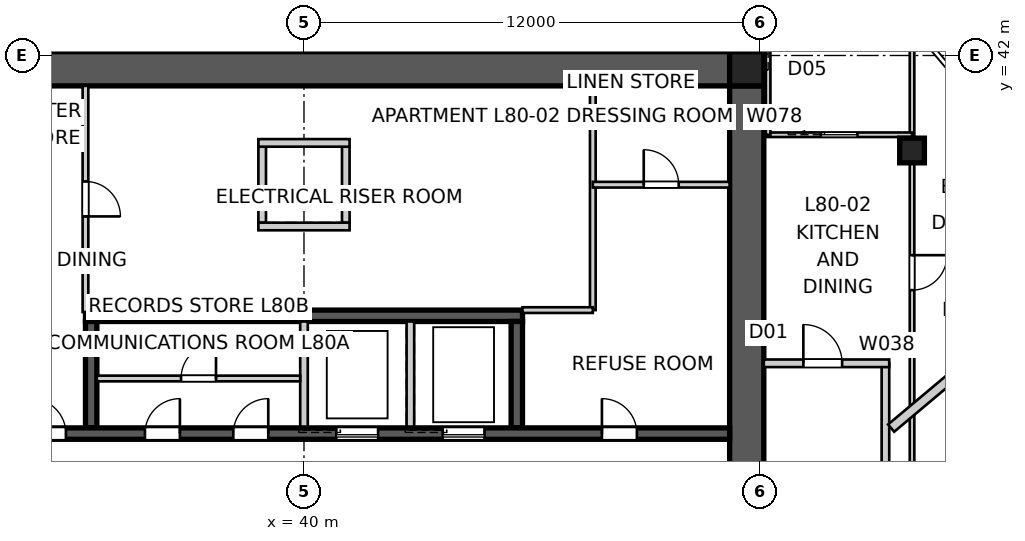
"""IFC4 building model, lengths in metres.
Left out: names, types, materials, properties, quantities, classifications, styles, units other than length and angle.
Written with IfcOpenShell. Run it as: python <this file> out.ifc"""

import sys

from ifc_helpers import new_model, si_unit, direction, frame, frame_2d, origin, origin_2d, place, context, subcontext, project, spatial, polyline, rectangle, outline, extrude, element, fill, save


model = new_model("IFC4")
c1 = context("Model", 3, precision=1e-05, world=origin(), true_north=direction((0.0, 1.0)))
c2 = subcontext(c1, "Body", "Model", "MODEL_VIEW")
j1 = project(units=[si_unit("LENGTHUNIT", "METRE"), si_unit("PLANEANGLEUNIT", "RADIAN")], contexts=[c1])
p1 = place(None, origin())
s1 = spatial("IfcSite", under=j1, at=p1, CompositionType="ELEMENT")
p2 = place(p1, origin())
s2 = spatial("IfcBuilding", under=s1, at=p2, CompositionType="ELEMENT")
p3 = place(p2, frame((0.0, 0.0, 289.6)))
s3 = spatial("IfcBuildingStorey", under=s2, at=p3, CompositionType="ELEMENT", Elevation=289.6)
p4 = place(p3, frame((28.8, 41.65, 0.0), z_axis=(0.0, 0.0, 1.0), x_axis=(1.0, 0.0, 0.0)))
e1 = element("IfcWall", 1, at=p4, inside=s3, PredefinedType="SHEAR", context=c2, shape_type="SweptSolid", body=[
    extrude(outline(polyline([(0.0, -0.45), (22.4, -0.45), (22.4, -0.025), (22.85, -0.025), (22.85, 0.025), (22.4, 0.025), (22.4, 0.45), (0.0, 0.45), (0.0, 0.025), (-0.45, 0.025), (-0.45, -0.025), (0.0, -0.025), (0.0, -0.45)])), origin(), (0.0, 0.0, 1.0), 3.4),
])
p5 = place(p3, frame((51.65, 18.8, 0.0), z_axis=(0.0, 0.0, 1.0), x_axis=(0.0, 1.0, 0.0)))
e2 = element("IfcWall", 2, at=p5, inside=s3, PredefinedType="SHEAR", context=c2, shape_type="SweptSolid", body=[
    extrude(outline(polyline([(0.0, -0.45), (22.4, -0.45), (22.4, -0.025), (22.85, -0.025), (22.85, 0.025), (22.4, 0.025), (22.4, 0.45), (0.0, 0.45), (0.0, 0.025), (-0.45, 0.025), (-0.45, -0.025), (0.0, -0.025), (0.0, -0.45)])), origin(), (0.0, 0.0, 1.0), 3.4),
])
p6 = place(p5, frame((11.14, 0.0, 0.0)))
e3 = element("IfcOpeningElement", 3, at=p6, cuts=e2, PredefinedType="OPENING", context=c2, shape_type="SweptSolid", body=[
    extrude(rectangle(XDim=1.02, YDim=2.4, at=frame_2d((0.51, 1.2))), frame((0.0, 0.46, 0.0), z_axis=(0.0, -1.0, 0.0), x_axis=(1.0, 0.0, 0.0)), (0.0, 0.0, 1.0), 0.92),
])
p7 = place(p3, frame((28.8, 32.05, 0.0), z_axis=(0.0, 0.0, 1.0), x_axis=(1.0, 0.0, 0.0)))
e4 = element("IfcWall", 4, at=p7, inside=s3, PredefinedType="SHEAR", context=c2, shape_type="SweptSolid", body=[
    extrude(rectangle(XDim=22.4, YDim=0.3, at=frame_2d((11.2, 0.0))), origin(), (0.0, 0.0, 1.0), 3.4),
])
p8 = place(p7, frame((19.04, 0.0, 0.0)))
e5 = element("IfcOpeningElement", 5, at=p8, cuts=e4, PredefinedType="OPENING", context=c2, shape_type="SweptSolid", body=[
    extrude(rectangle(XDim=0.92, YDim=2.1, at=frame_2d((0.46, 1.05))), frame((0.0, 0.16, 0.0), z_axis=(0.0, -1.0, 0.0), x_axis=(1.0, 0.0, 0.0)), (0.0, 0.0, 1.0), 0.32),
])
p9 = place(p7, frame((1.265, 0.0, 0.0)))
e6 = element("IfcOpeningElement", 6, at=p9, cuts=e4, PredefinedType="OPENING", context=c2, shape_type="SweptSolid", body=[
    extrude(rectangle(XDim=1.02, YDim=2.1, at=frame_2d((0.51, 1.05))), frame((0.0, 0.16, 0.0), z_axis=(0.0, -1.0, 0.0), x_axis=(1.0, 0.0, 0.0)), (0.0, 0.0, 1.0), 0.32),
])
p10 = place(p7, frame((4.015, 0.0, 0.0)))
e7 = element("IfcOpeningElement", 7, at=p10, cuts=e4, PredefinedType="OPENING", context=c2, shape_type="SweptSolid", body=[
    extrude(rectangle(XDim=0.92, YDim=2.1, at=frame_2d((0.46, 1.05))), frame((0.0, 0.16, 0.0), z_axis=(0.0, -1.0, 0.0), x_axis=(1.0, 0.0, 0.0)), (0.0, 0.0, 1.0), 0.32),
])
p11 = place(p7, frame((7.015, 0.0, 0.0)))
e8 = element("IfcOpeningElement", 8, at=p11, cuts=e4, PredefinedType="OPENING", context=c2, shape_type="SweptSolid", body=[
    extrude(rectangle(XDim=0.92, YDim=2.1, at=frame_2d((0.46, 1.05))), frame((0.0, 0.16, 0.0), z_axis=(0.0, -1.0, 0.0), x_axis=(1.0, 0.0, 0.0)), (0.0, 0.0, 1.0), 0.32),
])
p12 = place(p7, frame((9.34, 0.0, 0.0)))
e9 = element("IfcOpeningElement", 9, at=p12, cuts=e4, PredefinedType="OPENING", context=c2, shape_type="SweptSolid", body=[
    extrude(rectangle(XDim=0.92, YDim=2.1, at=frame_2d((0.46, 1.05))), frame((0.0, 0.16, 0.0), z_axis=(0.0, -1.0, 0.0), x_axis=(1.0, 0.0, 0.0)), (0.0, 0.0, 1.0), 0.32),
])
p13 = place(p7, frame((12.05, 0.0, 0.0)))
e10 = element("IfcOpeningElement", 10, at=p13, cuts=e4, PredefinedType="OPENING", context=c2, shape_type="SweptSolid", body=[
    extrude(rectangle(XDim=1.1, YDim=2.1, at=frame_2d((0.55, 1.05))), frame((0.0, 0.16, 0.0), z_axis=(0.0, -1.0, 0.0), x_axis=(1.0, 0.0, 0.0)), (0.0, 0.0, 1.0), 0.32),
])
p14 = place(p7, frame((14.85, 0.0, 0.0)))
e11 = element("IfcOpeningElement", 11, at=p14, cuts=e4, PredefinedType="OPENING", context=c2, shape_type="SweptSolid", body=[
    extrude(rectangle(XDim=1.1, YDim=2.1, at=frame_2d((0.55, 1.05))), frame((0.0, 0.16, 0.0), z_axis=(0.0, -1.0, 0.0), x_axis=(1.0, 0.0, 0.0)), (0.0, 0.0, 1.0), 0.32),
])
p15 = place(p3, frame((34.25, 35.15, 0.0), z_axis=(0.0, 0.0, 1.0), x_axis=(1.0, 0.0, 0.0)))
e12 = element("IfcWall", 12, at=p15, inside=s3, PredefinedType="SHEAR", context=c2, shape_type="SweptSolid", body=[
    extrude(rectangle(XDim=11.5, YDim=0.3, at=frame_2d((5.75, 0.0))), origin(), (0.0, 0.0, 1.0), 3.4),
])
p16 = place(p3, frame((34.4, 32.2, 0.0), z_axis=(0.0, 0.0, 1.0), x_axis=(0.0, 1.0, 0.0)))
e13 = element("IfcWall", 13, at=p16, inside=s3, PredefinedType="SHEAR", context=c2, shape_type="SweptSolid", body=[
    extrude(rectangle(XDim=2.8, YDim=0.3, at=frame_2d((1.4, 0.0))), origin(), (0.0, 0.0, 1.0), 3.4),
])
for number, where, z_axis, x_axis in (
    (14, (40.0, 32.2, 0.0), (0.0, 0.0, 1.0), (0.0, 1.0, 0.0)),
    (15, (42.8, 32.2, 0.0), (0.0, 0.0, 1.0), (0.0, 1.0, 0.0)),
):
    element("IfcWall", number, at=place(p3, frame(where, z_axis=z_axis, x_axis=x_axis)), inside=s3, PredefinedType="SOLIDWALL", context=c2, shape_type="SweptSolid", body=[
        extrude(rectangle(XDim=2.8, YDim=0.2, at=frame_2d((1.4, 0.0))), origin(), (0.0, 0.0, 1.0), 3.4),
    ])
p17 = place(p3, frame((45.6, 32.2, 0.0), z_axis=(0.0, 0.0, 1.0), x_axis=(0.0, 1.0, 0.0)))
e16 = element("IfcWall", 16, at=p17, inside=s3, PredefinedType="SHEAR", context=c2, shape_type="SweptSolid", body=[
    extrude(rectangle(XDim=2.8, YDim=0.3, at=frame_2d((1.4, 0.0))), origin(), (0.0, 0.0, 1.0), 3.4),
])
for number, where, z_axis, x_axis in (
    (17, (38.9, 37.6, 0.0), (0.0, 0.0, 1.0), (0.0, 1.0, 0.0)),
    (18, (41.1, 37.6, 0.0), (0.0, 0.0, 1.0), (0.0, 1.0, 0.0)),
):
    element("IfcWall", number, at=place(p3, frame(where, z_axis=z_axis, x_axis=x_axis)), inside=s3, PredefinedType="SOLIDWALL", context=c2, shape_type="SweptSolid", body=[
        extrude(rectangle(XDim=2.0, YDim=0.2, at=frame_2d((1.0, 0.0))), origin(), (0.0, 0.0, 1.0), 3.4),
    ])
for number, where, z_axis, x_axis in (
    (19, (38.8, 37.5, 0.0), (0.0, 0.0, 1.0), (1.0, 0.0, 0.0)),
    (20, (38.8, 39.7, 0.0), (0.0, 0.0, 1.0), (1.0, 0.0, 0.0)),
):
    element("IfcWall", number, at=place(p3, frame(where, z_axis=z_axis, x_axis=x_axis)), inside=s3, PredefinedType="SOLIDWALL", context=c2, shape_type="SweptSolid", body=[
        extrude(rectangle(XDim=2.4, YDim=0.2, at=frame_2d((1.2, 0.0))), origin(), (0.0, 0.0, 1.0), 3.4),
    ])
p18 = place(p3, frame((51.65, 41.65, 0.0), z_axis=(0.0, 0.0, 1.0), x_axis=(1.0, 0.0, 0.0)))
e21 = element("IfcColumn", 21, at=p18, inside=s3, PredefinedType="COLUMN", context=c2, shape_type="SweptSolid", body=[
    extrude(rectangle(XDim=0.9, YDim=0.9, at=origin_2d()), origin(), (0.0, 0.0, 1.0), 3.4),
])
p19 = place(p3, frame((56.0, 39.5, 0.0), z_axis=(0.0, 0.0, 1.0), x_axis=(1.0, 0.0, 0.0)))
e22 = element("IfcColumn", 22, at=p19, inside=s3, PredefinedType="COLUMN", context=c2, shape_type="SweptSolid", body=[
    extrude(rectangle(XDim=0.65, YDim=0.65, at=origin_2d()), origin(), (0.0, 0.0, 1.0), 3.4),
])
p20 = place(p3, frame((55.3, 26.1, 0.0), z_axis=(0.0, 0.0, 1.0), x_axis=(0.0, 1.0, 0.0)))
e23 = element("IfcWall", 23, at=p20, inside=s3, PredefinedType="PARTITIONING", context=c2, shape_type="SweptSolid", body=[
    extrude(rectangle(XDim=7.8, YDim=0.2, at=frame_2d((3.9, 0.0))), origin(), (0.0, 0.0, 1.0), 3.25),
])
p21 = place(p3, frame((52.1, 33.9, 0.0), z_axis=(0.0, 0.0, 1.0), x_axis=(1.0, 0.0, 0.0)))
e24 = element("IfcWall", 24, at=p21, inside=s3, PredefinedType="PARTITIONING", context=c2, shape_type="SweptSolid", body=[
    extrude(rectangle(XDim=3.3, YDim=0.2, at=frame_2d((1.65, 0.0))), origin(), (0.0, 0.0, 1.0), 3.25),
])
p22 = place(p21, frame((1.04, 0.0, 0.0)))
e25 = element("IfcOpeningElement", 25, at=p22, cuts=e24, PredefinedType="OPENING", context=c2, shape_type="SweptSolid", body=[
    extrude(rectangle(XDim=1.02, YDim=2.34, at=frame_2d((0.51, 1.17))), frame((0.0, 0.11, 0.0), z_axis=(0.0, -1.0, 0.0), x_axis=(1.0, 0.0, 0.0)), (0.0, 0.0, 1.0), 0.22),
])
p23 = place(p3, frame((61.007, 36.857, 0.0), z_axis=(0.0, 0.0, 1.0), x_axis=(-0.766054150891, -0.642776040237, 0.0)))
e26 = element("IfcWall", 26, at=p23, inside=s3, PredefinedType="PARTITIONING", context=c2, shape_type="SweptSolid", body=[
    extrude(rectangle(XDim=7.254, YDim=0.25, at=frame_2d((3.627, 0.0))), origin(), (0.0, 0.0, 1.0), 3.25),
])
p24 = place(p3, frame((34.25, 41.2, 0.0), z_axis=(0.0, 0.0, 1.0), x_axis=(0.0, -1.0, 0.0)))
e27 = element("IfcWall", 27, at=p24, inside=s3, PredefinedType="SOLIDWALL", context=c2, shape_type="SweptSolid", body=[
    extrude(rectangle(XDim=5.95, YDim=0.15, at=frame_2d((2.975, 0.0))), origin(), (0.0, 0.0, 1.0), 3.25),
])
p25 = place(p24, frame((2.515, 0.0, 0.0)))
e28 = element("IfcOpeningElement", 28, at=p25, cuts=e27, PredefinedType="OPENING", context=c2, shape_type="SweptSolid", body=[
    extrude(rectangle(XDim=0.92, YDim=2.1, at=frame_2d((0.46, 1.05))), frame((0.0, 0.085, 0.0), z_axis=(0.0, -1.0, 0.0), x_axis=(1.0, 0.0, 0.0)), (0.0, 0.0, 1.0), 0.17),
])
p26 = place(p3, frame((47.6, 41.2, 0.0), z_axis=(0.0, 0.0, 1.0), x_axis=(0.0, -1.0, 0.0)))
e29 = element("IfcWall", 29, at=p26, inside=s3, PredefinedType="SOLIDWALL", context=c2, shape_type="SweptSolid", body=[
    extrude(rectangle(XDim=5.9, YDim=0.15, at=frame_2d((2.95, 0.0))), origin(), (0.0, 0.0, 1.0), 3.25),
])
p27 = place(p3, frame((47.6, 35.3, 0.0), z_axis=(0.0, 0.0, 1.0), x_axis=(-1.0, 0.0, 0.0)))
e30 = element("IfcWall", 30, at=p27, inside=s3, PredefinedType="SOLIDWALL", context=c2, shape_type="SweptSolid", body=[
    extrude(rectangle(XDim=1.85, YDim=0.15, at=frame_2d((0.925, 0.0))), origin(), (0.0, 0.0, 1.0), 3.25),
])
p28 = place(p3, frame((47.6, 38.6, 0.0), z_axis=(0.0, 0.0, 1.0), x_axis=(1.0, 0.0, 0.0)))
e31 = element("IfcWall", 31, at=p28, inside=s3, PredefinedType="SOLIDWALL", context=c2, shape_type="SweptSolid", body=[
    extrude(rectangle(XDim=3.6, YDim=0.15, at=frame_2d((1.8, 0.0))), origin(), (0.0, 0.0, 1.0), 3.25),
])
p29 = place(p28, frame((1.34, 0.0, 0.0)))
e32 = element("IfcOpeningElement", 32, at=p29, cuts=e31, PredefinedType="OPENING", context=c2, shape_type="SweptSolid", body=[
    extrude(rectangle(XDim=0.92, YDim=2.1, at=frame_2d((0.46, 1.05))), frame((0.0, 0.085, 0.0), z_axis=(0.0, -1.0, 0.0), x_axis=(1.0, 0.0, 0.0)), (0.0, 0.0, 1.0), 0.17),
])
p30 = place(p3, frame((56.0, 42.762, 0.0), z_axis=(0.0, 0.0, 1.0), x_axis=(0.0, -1.0, 0.0)))
e33 = element("IfcWall", 33, at=p30, inside=s3, PredefinedType="PARTITIONING", context=c2, shape_type="SweptSolid", body=[
    extrude(rectangle(XDim=18.995, YDim=0.12, at=frame_2d((9.498, 0.0))), origin(), (0.0, 0.0, 1.0), 2.55),
])
p31 = place(p30, frame((17.238, 0.0, 0.0)))
e34 = element("IfcOpeningElement", 34, at=p31, cuts=e33, PredefinedType="OPENING", context=c2, shape_type="SweptSolid", body=[
    extrude(rectangle(XDim=0.92, YDim=2.34, at=frame_2d((0.46, 1.17))), frame((0.0, 0.07, 0.0), z_axis=(0.0, -1.0, 0.0), x_axis=(1.0, 0.0, 0.0)), (0.0, 0.0, 1.0), 0.14),
])
p32 = place(p30, frame((6.017, 0.0, 0.0)))
e35 = element("IfcOpeningElement", 35, at=p32, cuts=e33, PredefinedType="OPENING", context=c2, shape_type="SweptSolid", body=[
    extrude(rectangle(XDim=0.92, YDim=2.34, at=frame_2d((0.46, 1.17))), frame((0.0, 0.07, 0.0), z_axis=(0.0, -1.0, 0.0), x_axis=(1.0, 0.0, 0.0)), (0.0, 0.0, 1.0), 0.14),
])
p33 = place(p3, frame((52.163, 39.914, 0.0), z_axis=(0.0, 0.0, 1.0), x_axis=(1.0, 0.0, 0.0)))
e36 = element("IfcWall", 36, at=p33, inside=s3, PredefinedType="PARTITIONING", context=c2, shape_type="SweptSolid", body=[
    extrude(rectangle(XDim=3.837, YDim=0.12, at=frame_2d((1.918, 0.0))), origin(), (0.0, 0.0, 1.0), 3.25),
])
p34 = place(p33, frame((1.438, 0.0, 0.0)))
e37 = element("IfcOpeningElement", 37, at=p34, cuts=e36, PredefinedType="OPENING", context=c2, shape_type="SweptSolid", body=[
    extrude(rectangle(XDim=0.96, YDim=2.1, at=frame_2d((0.48, 1.05))), frame((0.0, 0.07, 0.0), z_axis=(0.0, -1.0, 0.0), x_axis=(1.0, 0.0, 0.0)), (0.0, 0.0, 1.0), 0.14),
])
p35 = place(p3, frame((52.213, 39.914, 0.0), z_axis=(0.0, 0.0, 1.0), x_axis=(0.0, 1.0, 0.0)))
e38 = element("IfcWall", 38, at=p35, inside=s3, PredefinedType="PARTITIONING", context=c2, shape_type="SweptSolid", body=[
    extrude(rectangle(XDim=6.086, YDim=0.12, at=frame_2d((3.043, 0.0))), origin(), (0.0, 0.0, 1.0), 3.25),
])
p36 = place(p35, frame((2.563, 0.0, 0.0)))
e39 = element("IfcOpeningElement", 39, at=p36, cuts=e38, PredefinedType="OPENING", context=c2, shape_type="SweptSolid", body=[
    extrude(rectangle(XDim=0.96, YDim=2.1, at=frame_2d((0.48, 1.05))), frame((0.0, 0.07, 0.0), z_axis=(0.0, -1.0, 0.0), x_axis=(1.0, 0.0, 0.0)), (0.0, 0.0, 1.0), 0.14),
])
p37 = place(p3, frame((34.55, 33.5, 0.0), z_axis=(0.0, 0.0, 1.0), x_axis=(1.0, 0.0, 0.0)))
e40 = element("IfcWall", 40, at=p37, inside=s3, PredefinedType="SOLIDWALL", context=c2, shape_type="SweptSolid", body=[
    extrude(rectangle(XDim=5.35, YDim=0.15, at=frame_2d((2.675, 0.0))), origin(), (0.0, 0.0, 1.0), 3.25),
])
p38 = place(p37, frame((2.215, 0.0, 0.0)))
e41 = element("IfcOpeningElement", 41, at=p38, cuts=e40, PredefinedType="OPENING", context=c2, shape_type="SweptSolid", body=[
    extrude(rectangle(XDim=0.92, YDim=2.1, at=frame_2d((0.46, 1.05))), frame((0.0, 0.085, 0.0), z_axis=(0.0, -1.0, 0.0), x_axis=(1.0, 0.0, 0.0)), (0.0, 0.0, 1.0), 0.17),
])
p39 = place(p8, origin())
e42 = element("IfcDoor", 42, at=p39, inside=s3, OperationType="SINGLE_SWING_LEFT", PredefinedType="DOOR", context=c2, shape_type="SweptSolid", body=[
    extrude(rectangle(XDim=0.92, YDim=2.1, at=frame_2d((0.46, 1.05))), frame((0.0, 0.025, 0.0), z_axis=(0.0, -1.0, 0.0), x_axis=(1.0, 0.0, 0.0)), (0.0, 0.0, 1.0), 0.05),
])
fill(e5, e42)
p40 = place(p10, origin())
e43 = element("IfcDoor", 43, at=p40, inside=s3, OperationType="SINGLE_SWING_LEFT", PredefinedType="DOOR", context=c2, shape_type="SweptSolid", body=[
    extrude(rectangle(XDim=0.92, YDim=2.1, at=frame_2d((0.46, 1.05))), frame((0.0, 0.025, 0.0), z_axis=(0.0, -1.0, 0.0), x_axis=(1.0, 0.0, 0.0)), (0.0, 0.0, 1.0), 0.05),
])
fill(e7, e43)
p41 = place(p22, origin())
e44 = element("IfcDoor", 44, at=p41, inside=s3, OperationType="SINGLE_SWING_LEFT", PredefinedType="DOOR", context=c2, shape_type="SweptSolid", body=[
    extrude(rectangle(XDim=1.02, YDim=2.34, at=frame_2d((0.51, 1.17))), frame((0.0, 0.025, 0.0), z_axis=(0.0, -1.0, 0.0), x_axis=(1.0, 0.0, 0.0)), (0.0, 0.0, 1.0), 0.05),
])
fill(e25, e44)
p42 = place(p29, origin())
e45 = element("IfcDoor", 45, at=p42, inside=s3, OperationType="SINGLE_SWING_LEFT", PredefinedType="DOOR", context=c2, shape_type="SweptSolid", body=[
    extrude(rectangle(XDim=0.92, YDim=2.1, at=frame_2d((0.46, 1.05))), frame((0.0, 0.025, 0.0), z_axis=(0.0, -1.0, 0.0), x_axis=(1.0, 0.0, 0.0)), (0.0, 0.0, 1.0), 0.05),
])
fill(e32, e45)
p43 = place(p25, origin())
e46 = element("IfcDoor", 46, at=p43, inside=s3, OperationType="SINGLE_SWING_RIGHT", PredefinedType="DOOR", context=c2, shape_type="SweptSolid", body=[
    extrude(rectangle(XDim=0.92, YDim=2.1, at=frame_2d((0.46, 1.05))), frame((0.0, 0.025, 0.0), z_axis=(0.0, -1.0, 0.0), x_axis=(1.0, 0.0, 0.0)), (0.0, 0.0, 1.0), 0.05),
])
fill(e28, e46)
p44 = place(p32, origin())
e47 = element("IfcDoor", 47, at=p44, inside=s3, OperationType="SINGLE_SWING_LEFT", PredefinedType="DOOR", context=c2, shape_type="SweptSolid", body=[
    extrude(rectangle(XDim=0.92, YDim=2.34, at=frame_2d((0.46, 1.17))), frame((0.0, 0.025, 0.0), z_axis=(0.0, -1.0, 0.0), x_axis=(1.0, 0.0, 0.0)), (0.0, 0.0, 1.0), 0.05),
])
fill(e35, e47)
p45 = place(p34, origin())
e48 = element("IfcDoor", 48, at=p45, inside=s3, OperationType="SLIDING_TO_LEFT", PredefinedType="DOOR", context=c2, shape_type="SweptSolid", body=[
    extrude(rectangle(XDim=0.96, YDim=2.1, at=frame_2d((0.48, 1.05))), frame((0.0, 0.025, 0.0), z_axis=(0.0, -1.0, 0.0), x_axis=(1.0, 0.0, 0.0)), (0.0, 0.0, 1.0), 0.05),
])
fill(e37, e48)
p46 = place(p11, origin())
e49 = element("IfcDoor", 49, at=p46, inside=s3, OperationType="SINGLE_SWING_RIGHT", PredefinedType="DOOR", context=c2, shape_type="SweptSolid", body=[
    extrude(rectangle(XDim=0.92, YDim=2.1, at=frame_2d((0.46, 1.05))), frame((0.0, 0.025, 0.0), z_axis=(0.0, -1.0, 0.0), x_axis=(1.0, 0.0, 0.0)), (0.0, 0.0, 1.0), 0.05),
])
fill(e8, e49)
p47 = place(p12, origin())
e50 = element("IfcDoor", 50, at=p47, inside=s3, OperationType="SINGLE_SWING_RIGHT", PredefinedType="DOOR", context=c2, shape_type="SweptSolid", body=[
    extrude(rectangle(XDim=0.92, YDim=2.1, at=frame_2d((0.46, 1.05))), frame((0.0, 0.025, 0.0), z_axis=(0.0, -1.0, 0.0), x_axis=(1.0, 0.0, 0.0)), (0.0, 0.0, 1.0), 0.05),
])
fill(e9, e50)
p48 = place(p38, origin())
e51 = element("IfcDoor", 51, at=p48, inside=s3, OperationType="SINGLE_SWING_RIGHT", PredefinedType="DOOR", context=c2, shape_type="SweptSolid", body=[
    extrude(rectangle(XDim=0.92, YDim=2.1, at=frame_2d((0.46, 1.05))), frame((0.0, 0.025, 0.0), z_axis=(0.0, -1.0, 0.0), x_axis=(1.0, 0.0, 0.0)), (0.0, 0.0, 1.0), 0.05),
])
fill(e41, e51)
p49 = place(p13, origin())
e52 = element("IfcDoor", 52, at=p49, inside=s3, OperationType="SLIDING_TO_LEFT", PredefinedType="DOOR", context=c2, shape_type="SweptSolid", body=[
    extrude(rectangle(XDim=1.1, YDim=2.1, at=frame_2d((0.55, 1.05))), frame((0.0, 0.025, 0.0), z_axis=(0.0, -1.0, 0.0), x_axis=(1.0, 0.0, 0.0)), (0.0, 0.0, 1.0), 0.05),
])
fill(e10, e52)
p50 = place(p14, origin())
e53 = element("IfcDoor", 53, at=p50, inside=s3, OperationType="SLIDING_TO_LEFT", PredefinedType="DOOR", context=c2, shape_type="SweptSolid", body=[
    extrude(rectangle(XDim=1.1, YDim=2.1, at=frame_2d((0.55, 1.05))), frame((0.0, 0.025, 0.0), z_axis=(0.0, -1.0, 0.0), x_axis=(1.0, 0.0, 0.0)), (0.0, 0.0, 1.0), 0.05),
])
fill(e11, e53)
save(model, sys.argv[1])
